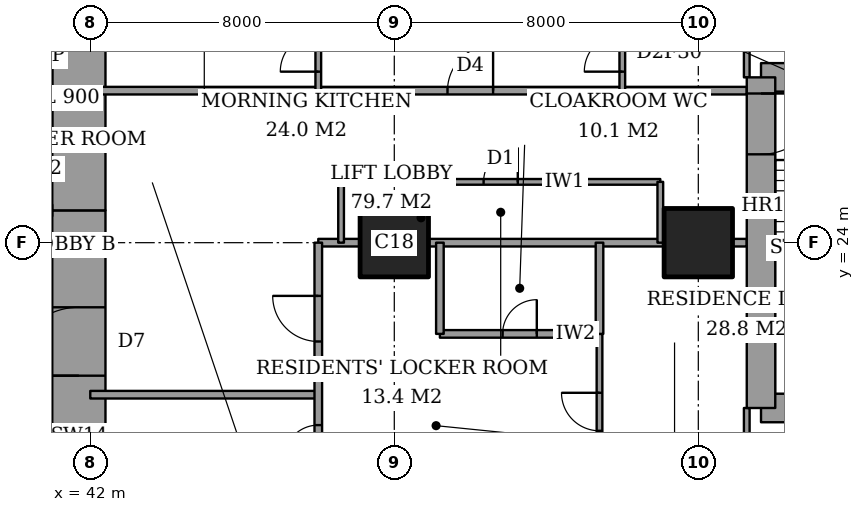
"""IFC4 building model, lengths in metres.
Left out: names, types, materials, properties, quantities, classifications, styles, units other than length and angle.
Written with IfcOpenShell. Run it as: python <this file> out.ifc"""

import sys

from ifc_helpers import new_model, si_unit, direction, frame, frame_2d, origin, origin_2d, place, context, subcontext, project, spatial, rectangle, extrude, element, fill, save


model = new_model("IFC4")
c1 = context("Model", 3, precision=1e-05, world=origin(), true_north=direction((0.0, 1.0)))
c2 = subcontext(c1, "Body", "Model", "MODEL_VIEW")
j1 = project(units=[si_unit("LENGTHUNIT", "METRE"), si_unit("PLANEANGLEUNIT", "RADIAN")], contexts=[c1])
p1 = place(None, origin())
s1 = spatial("IfcSite", under=j1, at=p1, CompositionType="ELEMENT")
p2 = place(p1, origin())
s2 = spatial("IfcBuilding", under=s1, at=p2, CompositionType="ELEMENT")
p3 = place(p2, frame((0.0, 0.0, 218.2)))
s3 = spatial("IfcBuildingStorey", under=s2, at=p3, CompositionType="ELEMENT", Elevation=218.2)
for number, where, z_axis, x_axis in (
    (1, (50.0, 24.0, 0.0), (0.0, 0.0, 1.0), (1.0, 0.0, 0.0)),
    (2, (58.0, 24.0, 0.0), (0.0, 0.0, 1.0), (1.0, 0.0, 0.0)),
):
    element("IfcColumn", number, at=place(p3, frame(where, z_axis=z_axis, x_axis=x_axis)), inside=s3, PredefinedType="COLUMN", context=c2, shape_type="SweptSolid", body=[
        extrude(rectangle(XDim=1.8, YDim=1.8, at=origin_2d()), origin(), (0.0, 0.0, 1.0), 3.6),
    ])
p4 = place(p3, frame((41.7, 13.0, 0.0), z_axis=(0.0, 0.0, 1.0), x_axis=(0.0, 1.0, 0.0)))
e3 = element("IfcWall", 3, at=p4, inside=s3, PredefinedType="SHEAR", context=c2, shape_type="SweptSolid", body=[
    extrude(rectangle(XDim=11.85, YDim=1.4, at=frame_2d((5.925, 0.0))), origin(), (0.0, 0.0, 1.0), 3.6),
])
p5 = place(p4, frame((7.5, 0.0, 0.0)))
e4 = element("IfcOpeningElement", 4, at=p5, cuts=e3, PredefinedType="OPENING", context=c2, shape_type="SweptSolid", body=[
    extrude(rectangle(XDim=1.8, YDim=2.4, at=frame_2d((0.9, 1.2))), frame((0.0, 0.71, 0.0), z_axis=(0.0, -1.0, 0.0), x_axis=(1.0, 0.0, 0.0)), (0.0, 0.0, 1.0), 1.42),
])
p6 = place(p3, frame((41.7, 24.85, 0.0), z_axis=(0.0, 0.0, 1.0), x_axis=(0.0, 1.0, 0.0)))
e5 = element("IfcWall", 5, at=p6, inside=s3, PredefinedType="SHEAR", context=c2, shape_type="SweptSolid", body=[
    extrude(rectangle(XDim=10.15, YDim=1.4, at=frame_2d((5.075, 0.0))), origin(), (0.0, 0.0, 1.0), 3.6),
])
for number, where, z_axis, x_axis in (
    (6, (59.65, 19.65, 0.0), (0.0, 0.0, 1.0), (1.0, 0.0, 0.0)),
    (7, (64.1, 28.35, 0.0), (0.0, 0.0, 1.0), (-1.0, 0.0, 0.0)),
):
    element("IfcWall", number, at=place(p3, frame(where, z_axis=z_axis, x_axis=x_axis)), inside=s3, PredefinedType="SHEAR", context=c2, shape_type="SweptSolid", body=[
        extrude(rectangle(XDim=4.45, YDim=0.75, at=frame_2d((2.225, 0.0))), origin(), (0.0, 0.0, 1.0), 3.6),
    ])
p7 = place(p3, frame((59.65, 28.35, 0.0), z_axis=(0.0, 0.0, 1.0), x_axis=(0.0, -1.0, 0.0)))
e8 = element("IfcWall", 8, at=p7, inside=s3, PredefinedType="SHEAR", context=c2, shape_type="SweptSolid", body=[
    extrude(rectangle(XDim=8.7, YDim=0.75, at=frame_2d((4.35, 0.0))), origin(), (0.0, 0.0, 1.0), 3.6),
])
p8 = place(p7, frame((0.425, 0.0, 0.0)))
e9 = element("IfcOpeningElement", 9, at=p8, cuts=e8, PredefinedType="OPENING", context=c2, shape_type="SweptSolid", body=[
    extrude(rectangle(XDim=1.6, YDim=2.1, at=frame_2d((0.8, 1.05))), frame((0.0, 0.385, 0.0), z_axis=(0.0, -1.0, 0.0), x_axis=(1.0, 0.0, 0.0)), (0.0, 0.0, 1.0), 0.77),
])
p9 = place(p3, frame((42.0, 20.0, 0.0), z_axis=(0.0, 0.0, 1.0), x_axis=(1.0, 0.0, 0.0)))
e10 = element("IfcWall", 10, at=p9, inside=s3, PredefinedType="PARTITIONING", context=c2, shape_type="SweptSolid", body=[
    extrude(rectangle(XDim=6.0, YDim=0.2, at=frame_2d((3.0, 0.0))), origin(), (0.0, 0.0, 1.0), 3.35),
])
p10 = place(p3, frame((51.2, 21.6, 0.0), z_axis=(0.0, 0.0, 1.0), x_axis=(1.0, 0.0, 0.0)))
e11 = element("IfcWall", 11, at=p10, inside=s3, PredefinedType="PARTITIONING", context=c2, shape_type="SweptSolid", body=[
    extrude(rectangle(XDim=4.2, YDim=0.2, at=frame_2d((2.1, 0.0))), origin(), (0.0, 0.0, 1.0), 3.35),
])
p11 = place(p10, frame((1.65, 0.0, 0.0)))
e12 = element("IfcOpeningElement", 12, at=p11, cuts=e11, PredefinedType="OPENING", context=c2, shape_type="SweptSolid", body=[
    extrude(rectangle(XDim=0.9, YDim=2.1, at=frame_2d((0.45, 1.05))), frame((0.0, 0.11, 0.0), z_axis=(0.0, -1.0, 0.0), x_axis=(1.0, 0.0, 0.0)), (0.0, 0.0, 1.0), 0.22),
])
p12 = place(p3, frame((48.0, 24.0, 0.0), z_axis=(0.0, 0.0, 1.0), x_axis=(1.0, 0.0, 0.0)))
e13 = element("IfcWall", 13, at=p12, inside=s3, PredefinedType="PARTITIONING", context=c2, shape_type="SweptSolid", body=[
    extrude(rectangle(XDim=1.1, YDim=0.2, at=frame_2d((0.55, 0.0))), origin(), (0.0, 0.0, 1.0), 3.35),
])
p13 = place(p3, frame((50.9, 24.0, 0.0), z_axis=(0.0, 0.0, 1.0), x_axis=(1.0, 0.0, 0.0)))
e14 = element("IfcWall", 14, at=p13, inside=s3, PredefinedType="PARTITIONING", context=c2, shape_type="SweptSolid", body=[
    extrude(rectangle(XDim=6.2, YDim=0.2, at=frame_2d((3.1, 0.0))), origin(), (0.0, 0.0, 1.0), 3.35),
])
p14 = place(p3, frame((58.9, 24.0, 0.0), z_axis=(0.0, 0.0, 1.0), x_axis=(1.0, 0.0, 0.0)))
e15 = element("IfcWall", 15, at=p14, inside=s3, PredefinedType="PARTITIONING", context=c2, shape_type="SweptSolid", body=[
    extrude(rectangle(XDim=0.375, YDim=0.2, at=frame_2d((0.188, 0.0))), origin(), (0.0, 0.0, 1.0), 3.35),
])
p15 = place(p3, frame((48.6, 25.6, 0.0), z_axis=(0.0, 0.0, 1.0), x_axis=(1.0, 0.0, 0.0)))
e16 = element("IfcWall", 16, at=p15, inside=s3, PredefinedType="PARTITIONING", context=c2, shape_type="SweptSolid", body=[
    extrude(rectangle(XDim=8.4, YDim=0.15, at=frame_2d((4.2, 0.0))), origin(), (0.0, 0.0, 1.0), 3.35),
])
p16 = place(p15, frame((3.75, 0.0, 0.0)))
e17 = element("IfcOpeningElement", 17, at=p16, cuts=e16, PredefinedType="OPENING", context=c2, shape_type="SweptSolid", body=[
    extrude(rectangle(XDim=0.9, YDim=2.1, at=frame_2d((0.45, 1.05))), frame((0.0, 0.085, 0.0), z_axis=(0.0, -1.0, 0.0), x_axis=(1.0, 0.0, 0.0)), (0.0, 0.0, 1.0), 0.17),
])
p17 = place(p3, frame((42.0, 28.0, 0.0), z_axis=(0.0, 0.0, 1.0), x_axis=(1.0, 0.0, 0.0)))
e18 = element("IfcWall", 18, at=p17, inside=s3, PredefinedType="PARTITIONING", context=c2, shape_type="SweptSolid", body=[
    extrude(rectangle(XDim=17.275, YDim=0.2, at=frame_2d((8.637, 0.0))), origin(), (0.0, 0.0, 1.0), 3.35),
])
p18 = place(p17, frame((9.4, 0.0, 0.0)))
e19 = element("IfcOpeningElement", 19, at=p18, cuts=e18, PredefinedType="OPENING", context=c2, shape_type="SweptSolid", body=[
    extrude(rectangle(XDim=1.2, YDim=2.4, at=frame_2d((0.6, 1.2))), frame((0.0, 0.11, 0.0), z_axis=(0.0, -1.0, 0.0), x_axis=(1.0, 0.0, 0.0)), (0.0, 0.0, 1.0), 0.22),
])
p19 = place(p3, frame((48.0, 17.5, 0.0), z_axis=(0.0, 0.0, 1.0), x_axis=(0.0, 1.0, 0.0)))
e20 = element("IfcWall", 20, at=p19, inside=s3, PredefinedType="PARTITIONING", context=c2, shape_type="SweptSolid", body=[
    extrude(rectangle(XDim=6.5, YDim=0.2, at=frame_2d((3.25, 0.0))), origin(), (0.0, 0.0, 1.0), 3.35),
])
p20 = place(p19, frame((3.9, 0.0, 0.0)))
e21 = element("IfcOpeningElement", 21, at=p20, cuts=e20, PredefinedType="OPENING", context=c2, shape_type="SweptSolid", body=[
    extrude(rectangle(XDim=1.2, YDim=2.4, at=frame_2d((0.6, 1.2))), frame((0.0, 0.11, 0.0), z_axis=(0.0, -1.0, 0.0), x_axis=(1.0, 0.0, 0.0)), (0.0, 0.0, 1.0), 0.22),
])
p21 = place(p19, frame((0.8, 0.0, 0.0)))
e22 = element("IfcOpeningElement", 22, at=p21, cuts=e20, PredefinedType="OPENING", context=c2, shape_type="SweptSolid", body=[
    extrude(rectangle(XDim=0.9, YDim=2.1, at=frame_2d((0.45, 1.05))), frame((0.0, 0.11, 0.0), z_axis=(0.0, -1.0, 0.0), x_axis=(1.0, 0.0, 0.0)), (0.0, 0.0, 1.0), 0.22),
])
p22 = place(p3, frame((48.0, 28.0, 0.0), z_axis=(0.0, 0.0, 1.0), x_axis=(0.0, 1.0, 0.0)))
e23 = element("IfcWall", 23, at=p22, inside=s3, PredefinedType="PARTITIONING", context=c2, shape_type="SweptSolid", body=[
    extrude(rectangle(XDim=9.4, YDim=0.15, at=frame_2d((4.7, 0.0))), origin(), (0.0, 0.0, 1.0), 3.35),
])
p23 = place(p22, frame((0.5, 0.0, 0.0)))
e24 = element("IfcOpeningElement", 24, at=p23, cuts=e23, PredefinedType="OPENING", context=c2, shape_type="SweptSolid", body=[
    extrude(rectangle(XDim=1.0, YDim=2.1, at=frame_2d((0.5, 1.05))), frame((0.0, 0.085, 0.0), z_axis=(0.0, -1.0, 0.0), x_axis=(1.0, 0.0, 0.0)), (0.0, 0.0, 1.0), 0.17),
])
p24 = place(p3, frame((48.6, 24.0, 0.0), z_axis=(0.0, 0.0, 1.0), x_axis=(0.0, 1.0, 0.0)))
e25 = element("IfcWall", 25, at=p24, inside=s3, PredefinedType="PARTITIONING", context=c2, shape_type="SweptSolid", body=[
    extrude(rectangle(XDim=1.6, YDim=0.15, at=frame_2d((0.8, 0.0))), origin(), (0.0, 0.0, 1.0), 3.35),
])
for number, where, z_axis, x_axis in (
    (26, (51.2, 21.6, 0.0), (0.0, 0.0, 1.0), (0.0, 1.0, 0.0)),
    (27, (55.4, 21.6, 0.0), (0.0, 0.0, 1.0), (0.0, 1.0, 0.0)),
):
    element("IfcWall", number, at=place(p3, frame(where, z_axis=z_axis, x_axis=x_axis)), inside=s3, PredefinedType="PARTITIONING", context=c2, shape_type="SweptSolid", body=[
        extrude(rectangle(XDim=2.4, YDim=0.2, at=frame_2d((1.2, 0.0))), origin(), (0.0, 0.0, 1.0), 3.35),
    ])
p25 = place(p3, frame((55.4, 11.0, 0.0), z_axis=(0.0, 0.0, 1.0), x_axis=(0.0, 1.0, 0.0)))
e28 = element("IfcWall", 28, at=p25, inside=s3, PredefinedType="PARTITIONING", context=c2, shape_type="SweptSolid", body=[
    extrude(rectangle(XDim=10.6, YDim=0.15, at=frame_2d((5.3, 0.0))), origin(), (0.0, 0.0, 1.0), 3.35),
])
p26 = place(p25, frame((8.05, 0.0, 0.0)))
e29 = element("IfcOpeningElement", 29, at=p26, cuts=e28, PredefinedType="OPENING", context=c2, shape_type="SweptSolid", body=[
    extrude(rectangle(XDim=1.0, YDim=2.1, at=frame_2d((0.5, 1.05))), frame((0.0, 0.085, 0.0), z_axis=(0.0, -1.0, 0.0), x_axis=(1.0, 0.0, 0.0)), (0.0, 0.0, 1.0), 0.17),
])
p27 = place(p3, frame((56.0, 28.0, 0.0), z_axis=(0.0, 0.0, 1.0), x_axis=(0.0, 1.0, 0.0)))
e30 = element("IfcWall", 30, at=p27, inside=s3, PredefinedType="PARTITIONING", context=c2, shape_type="SweptSolid", body=[
    extrude(rectangle(XDim=9.4, YDim=0.15, at=frame_2d((4.7, 0.0))), origin(), (0.0, 0.0, 1.0), 3.35),
])
p28 = place(p27, frame((0.5, 0.0, 0.0)))
e31 = element("IfcOpeningElement", 31, at=p28, cuts=e30, PredefinedType="OPENING", context=c2, shape_type="SweptSolid", body=[
    extrude(rectangle(XDim=1.0, YDim=2.1, at=frame_2d((0.5, 1.05))), frame((0.0, 0.085, 0.0), z_axis=(0.0, -1.0, 0.0), x_axis=(1.0, 0.0, 0.0)), (0.0, 0.0, 1.0), 0.17),
])
p29 = place(p3, frame((57.0, 24.0, 0.0), z_axis=(0.0, 0.0, 1.0), x_axis=(0.0, 1.0, 0.0)))
e32 = element("IfcWall", 32, at=p29, inside=s3, PredefinedType="PARTITIONING", context=c2, shape_type="SweptSolid", body=[
    extrude(rectangle(XDim=1.6, YDim=0.15, at=frame_2d((0.8, 0.0))), origin(), (0.0, 0.0, 1.0), 3.35),
])
p30 = place(p3, frame((59.275, 17.2, 0.0), z_axis=(0.0, 0.0, 1.0), x_axis=(0.0, 1.0, 0.0)))
e33 = element("IfcWall", 33, at=p30, inside=s3, PredefinedType="PARTITIONING", context=c2, shape_type="SweptSolid", body=[
    extrude(rectangle(XDim=2.45, YDim=0.15, at=frame_2d((1.225, 0.0))), origin(), (0.0, 0.0, 1.0), 3.35),
])
p31 = place(p30, frame((0.587, 0.0, 0.0)))
e34 = element("IfcOpeningElement", 34, at=p31, cuts=e33, PredefinedType="OPENING", context=c2, shape_type="SweptSolid", body=[
    extrude(rectangle(XDim=0.9, YDim=2.1, at=frame_2d((0.45, 1.05))), frame((0.0, 0.085, 0.0), z_axis=(0.0, -1.0, 0.0), x_axis=(1.0, 0.0, 0.0)), (0.0, 0.0, 1.0), 0.17),
])
p32 = place(p3, frame((59.275, 28.35, 0.0), z_axis=(0.0, 0.0, 1.0), x_axis=(0.0, 1.0, 0.0)))
e35 = element("IfcWall", 35, at=p32, inside=s3, PredefinedType="PARTITIONING", context=c2, shape_type="SweptSolid", body=[
    extrude(rectangle(XDim=2.45, YDim=0.15, at=frame_2d((1.225, 0.0))), origin(), (0.0, 0.0, 1.0), 3.35),
])
p33 = place(p32, frame((0.962, 0.0, 0.0)))
e36 = element("IfcOpeningElement", 36, at=p33, cuts=e35, PredefinedType="OPENING", context=c2, shape_type="SweptSolid", body=[
    extrude(rectangle(XDim=0.9, YDim=2.1, at=frame_2d((0.45, 1.05))), frame((0.0, 0.085, 0.0), z_axis=(0.0, -1.0, 0.0), x_axis=(1.0, 0.0, 0.0)), (0.0, 0.0, 1.0), 0.17),
])
p34 = place(p26, origin())
e37 = element("IfcDoor", 37, at=p34, inside=s3, OperationType="SINGLE_SWING_LEFT", PredefinedType="DOOR", context=c2, shape_type="SweptSolid", body=[
    extrude(rectangle(XDim=1.0, YDim=2.1, at=frame_2d((0.5, 1.05))), frame((0.0, 0.025, 0.0), z_axis=(0.0, -1.0, 0.0), x_axis=(1.0, 0.0, 0.0)), (0.0, 0.0, 1.0), 0.05),
])
fill(e29, e37)
p35 = place(p11, origin())
e38 = element("IfcDoor", 38, at=p35, inside=s3, OperationType="SINGLE_SWING_LEFT", PredefinedType="DOOR", context=c2, shape_type="SweptSolid", body=[
    extrude(rectangle(XDim=0.9, YDim=2.1, at=frame_2d((0.45, 1.05))), frame((0.0, 0.025, 0.0), z_axis=(0.0, -1.0, 0.0), x_axis=(1.0, 0.0, 0.0)), (0.0, 0.0, 1.0), 0.05),
])
fill(e12, e38)
p36 = place(p20, origin())
e39 = element("IfcDoor", 39, at=p36, inside=s3, OperationType="SINGLE_SWING_LEFT", PredefinedType="DOOR", context=c2, shape_type="SweptSolid", body=[
    extrude(rectangle(XDim=1.2, YDim=2.4, at=frame_2d((0.6, 1.2))), frame((0.0, 0.025, 0.0), z_axis=(0.0, -1.0, 0.0), x_axis=(1.0, 0.0, 0.0)), (0.0, 0.0, 1.0), 0.05),
])
fill(e21, e39)
p37 = place(p21, origin())
e40 = element("IfcDoor", 40, at=p37, inside=s3, OperationType="SINGLE_SWING_RIGHT", PredefinedType="DOOR", context=c2, shape_type="SweptSolid", body=[
    extrude(rectangle(XDim=0.9, YDim=2.1, at=frame_2d((0.45, 1.05))), frame((0.0, 0.025, 0.0), z_axis=(0.0, -1.0, 0.0), x_axis=(1.0, 0.0, 0.0)), (0.0, 0.0, 1.0), 0.05),
])
fill(e22, e40)
p38 = place(p28, origin())
e41 = element("IfcDoor", 41, at=p38, inside=s3, OperationType="SINGLE_SWING_RIGHT", PredefinedType="DOOR", context=c2, shape_type="SweptSolid", body=[
    extrude(rectangle(XDim=1.0, YDim=2.1, at=frame_2d((0.5, 1.05))), frame((0.0, 0.025, 0.0), z_axis=(0.0, -1.0, 0.0), x_axis=(1.0, 0.0, 0.0)), (0.0, 0.0, 1.0), 0.05),
])
fill(e31, e41)
p39 = place(p18, origin())
e42 = element("IfcDoor", 42, at=p39, inside=s3, OperationType="SINGLE_SWING_LEFT", PredefinedType="DOOR", context=c2, shape_type="SweptSolid", body=[
    extrude(rectangle(XDim=1.2, YDim=2.4, at=frame_2d((0.6, 1.2))), frame((0.0, 0.025, 0.0), z_axis=(0.0, -1.0, 0.0), x_axis=(1.0, 0.0, 0.0)), (0.0, 0.0, 1.0), 0.05),
])
fill(e19, e42)
p40 = place(p23, origin())
e43 = element("IfcDoor", 43, at=p40, inside=s3, OperationType="SINGLE_SWING_RIGHT", PredefinedType="DOOR", context=c2, shape_type="SweptSolid", body=[
    extrude(rectangle(XDim=1.0, YDim=2.1, at=frame_2d((0.5, 1.05))), frame((0.0, 0.025, 0.0), z_axis=(0.0, -1.0, 0.0), x_axis=(1.0, 0.0, 0.0)), (0.0, 0.0, 1.0), 0.05),
])
fill(e24, e43)
p41 = place(p16, origin())
e44 = element("IfcDoor", 44, at=p41, inside=s3, OperationType="SINGLE_SWING_LEFT", PredefinedType="DOOR", context=c2, shape_type="SweptSolid", body=[
    extrude(rectangle(XDim=0.9, YDim=2.1, at=frame_2d((0.45, 1.05))), frame((0.0, 0.025, 0.0), z_axis=(0.0, -1.0, 0.0), x_axis=(1.0, 0.0, 0.0)), (0.0, 0.0, 1.0), 0.05),
])
fill(e17, e44)
p42 = place(p5, origin())
e45 = element("IfcDoor", 45, at=p42, inside=s3, OperationType="DOUBLE_DOOR_DOUBLE_SWING", PredefinedType="DOOR", context=c2, shape_type="SweptSolid", body=[
    extrude(rectangle(XDim=1.8, YDim=2.4, at=frame_2d((0.9, 1.2))), frame((0.0, 0.025, 0.0), z_axis=(0.0, -1.0, 0.0), x_axis=(1.0, 0.0, 0.0)), (0.0, 0.0, 1.0), 0.05),
])
fill(e4, e45)
p43 = place(p8, origin())
e46 = element("IfcDoor", 46, at=p43, inside=s3, OperationType="DOUBLE_DOOR_SINGLE_SWING", PredefinedType="DOOR", context=c2, shape_type="SweptSolid", body=[
    extrude(rectangle(XDim=1.6, YDim=2.1, at=frame_2d((0.8, 1.05))), frame((0.0, 0.025, 0.0), z_axis=(0.0, -1.0, 0.0), x_axis=(1.0, 0.0, 0.0)), (0.0, 0.0, 1.0), 0.05),
])
fill(e9, e46)
save(model, sys.argv[1])
